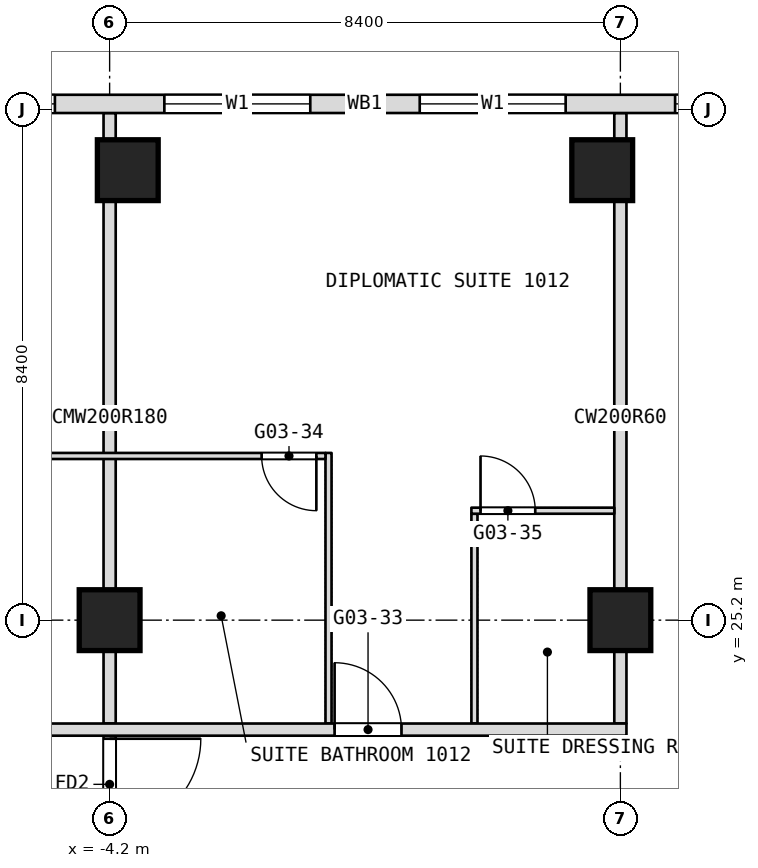
"""IFC4 building model, lengths in metres.
Left out: names, types, materials, properties, quantities, classifications, styles, units other than length and angle.
Written with IfcOpenShell. Run it as: python <this file> out.ifc"""

import sys

from ifc_helpers import new_model, si_unit, direction, frame, frame_2d, origin, origin_2d, place, context, subcontext, project, spatial, rectangle, extrude, element, fill, save


model = new_model("IFC4")
c1 = context("Model", 3, precision=1e-05, world=origin(), true_north=direction((0.0, 1.0)))
c2 = subcontext(c1, "Body", "Model", "MODEL_VIEW")
j1 = project(units=[si_unit("LENGTHUNIT", "METRE"), si_unit("PLANEANGLEUNIT", "RADIAN")], contexts=[c1])
p1 = place(None, origin())
s1 = spatial("IfcSite", under=j1, at=p1, CompositionType="ELEMENT")
p2 = place(p1, origin())
s2 = spatial("IfcBuilding", under=s1, at=p2, CompositionType="ELEMENT")
p3 = place(p2, frame((0.0, 0.0, 50.9)))
s3 = spatial("IfcBuildingStorey", under=s2, at=p3, CompositionType="ELEMENT", Elevation=50.9)
for number, where, z_axis, x_axis in (
    (1, (-4.2, 25.2, 0.0), (0.0, 0.0, 1.0), (1.0, 0.0, 0.0)),
    (2, (4.2, 25.2, 0.0), (0.0, 0.0, 1.0), (1.0, 0.0, 0.0)),
    (3, (-3.901, 32.6, 0.0), (0.0, 0.0, 1.0), (1.0, 0.0, 0.0)),
    (4, (3.901, 32.6, 0.0), (0.0, 0.0, 1.0), (1.0, 0.0, 0.0)),
):
    element("IfcColumn", number, at=place(p3, frame(where, z_axis=z_axis, x_axis=x_axis)), inside=s3, PredefinedType="COLUMN", context=c2, shape_type="SweptSolid", body=[
        extrude(rectangle(XDim=1.0, YDim=1.0, at=origin_2d()), origin(), (0.0, 0.0, 1.0), 3.6),
    ])
p4 = place(p3, frame((4.2, 23.5, 0.0), z_axis=(0.0, 0.0, 1.0), x_axis=(0.0, 1.0, 0.0)))
e5 = element("IfcWall", 5, at=p4, inside=s3, PredefinedType="PARTITIONING", context=c2, shape_type="SweptSolid", body=[
    extrude(rectangle(XDim=10.04, YDim=0.2, at=frame_2d((5.02, 0.0))), origin(), (0.0, 0.0, 1.0), 3.34),
])
p5 = place(p3, frame((1.8, 23.5, 0.0), z_axis=(0.0, 0.0, 1.0), x_axis=(0.0, 1.0, 0.0)))
e6 = element("IfcWall", 6, at=p5, inside=s3, PredefinedType="PARTITIONING", context=c2, shape_type="SweptSolid", body=[
    extrude(rectangle(XDim=3.45, YDim=0.1, at=frame_2d((1.725, 0.0))), origin(), (0.0, 0.0, 1.0), 3.34),
])
p6 = place(p3, frame((-0.6, 23.5, 0.0), z_axis=(0.0, 0.0, 1.0), x_axis=(0.0, 1.0, 0.0)))
e7 = element("IfcWall", 7, at=p6, inside=s3, PredefinedType="PARTITIONING", context=c2, shape_type="SweptSolid", body=[
    extrude(rectangle(XDim=4.45, YDim=0.1, at=frame_2d((2.225, 0.0))), origin(), (0.0, 0.0, 1.0), 3.34),
])
p7 = place(p3, frame((-4.2, 16.8, 0.0), z_axis=(0.0, 0.0, 1.0), x_axis=(0.0, 1.0, 0.0)))
e8 = element("IfcWall", 8, at=p7, inside=s3, PredefinedType="PARTITIONING", context=c2, shape_type="SweptSolid", body=[
    extrude(rectangle(XDim=6.7, YDim=0.2, at=frame_2d((3.35, 0.0))), origin(), (0.0, 0.0, 1.0), 3.34),
])
p8 = place(p7, frame((0.15, 0.0, 0.0)))
e9 = element("IfcOpeningElement", 9, at=p8, cuts=e8, PredefinedType="OPENING", context=c2, shape_type="SweptSolid", body=[
    extrude(rectangle(XDim=1.5, YDim=2.1, at=frame_2d((0.75, 1.05))), frame((0.0, 0.1, 0.0), z_axis=(0.0, -1.0, 0.0), x_axis=(1.0, 0.0, 0.0)), (0.0, 0.0, 1.0), 0.2),
])
p9 = place(p7, frame((4.95, 0.0, 0.0)))
e10 = element("IfcOpeningElement", 10, at=p9, cuts=e8, PredefinedType="OPENING", context=c2, shape_type="SweptSolid", body=[
    extrude(rectangle(XDim=1.5, YDim=2.1, at=frame_2d((0.75, 1.05))), frame((0.0, 0.1, 0.0), z_axis=(0.0, -1.0, 0.0), x_axis=(1.0, 0.0, 0.0)), (0.0, 0.0, 1.0), 0.2),
])
p10 = place(p3, frame((-4.2, 23.5, 0.0), z_axis=(0.0, 0.0, 1.0), x_axis=(0.0, 1.0, 0.0)))
e11 = element("IfcWall", 11, at=p10, inside=s3, PredefinedType="PARTITIONING", context=c2, shape_type="SweptSolid", body=[
    extrude(rectangle(XDim=10.04, YDim=0.2, at=frame_2d((5.02, 0.0))), origin(), (0.0, 0.0, 1.0), 3.34),
])
p11 = place(p3, frame((-16.7, 23.4, 0.0), z_axis=(0.0, 0.0, 1.0), x_axis=(1.0, 0.0, 0.0)))
e12 = element("IfcWall", 12, at=p11, inside=s3, PredefinedType="PARTITIONING", context=c2, shape_type="SweptSolid", body=[
    extrude(rectangle(XDim=21.0, YDim=0.2, at=frame_2d((10.5, 0.0))), origin(), (0.0, 0.0, 1.0), 3.34),
])
p12 = place(p11, frame((2.4, 0.0, 0.0)))
e13 = element("IfcOpeningElement", 13, at=p12, cuts=e12, PredefinedType="OPENING", context=c2, shape_type="SweptSolid", body=[
    extrude(rectangle(XDim=0.9, YDim=2.1, at=frame_2d((0.45, 1.05))), frame((0.0, 0.1, 0.0), z_axis=(0.0, -1.0, 0.0), x_axis=(1.0, 0.0, 0.0)), (0.0, 0.0, 1.0), 0.2),
])
p13 = place(p11, frame((7.7, 0.0, 0.0)))
e14 = element("IfcOpeningElement", 14, at=p13, cuts=e12, PredefinedType="OPENING", context=c2, shape_type="SweptSolid", body=[
    extrude(rectangle(XDim=1.1, YDim=2.1, at=frame_2d((0.55, 1.05))), frame((0.0, 0.1, 0.0), z_axis=(0.0, -1.0, 0.0), x_axis=(1.0, 0.0, 0.0)), (0.0, 0.0, 1.0), 0.2),
])
p14 = place(p11, frame((16.2, 0.0, 0.0)))
e15 = element("IfcOpeningElement", 15, at=p14, cuts=e12, PredefinedType="OPENING", context=c2, shape_type="SweptSolid", body=[
    extrude(rectangle(XDim=1.1, YDim=2.1, at=frame_2d((0.55, 1.05))), frame((0.0, 0.1, 0.0), z_axis=(0.0, -1.0, 0.0), x_axis=(1.0, 0.0, 0.0)), (0.0, 0.0, 1.0), 0.2),
])
p15 = place(p3, frame((1.75, 27.0, 0.0), z_axis=(0.0, 0.0, 1.0), x_axis=(1.0, 0.0, 0.0)))
e16 = element("IfcWall", 16, at=p15, inside=s3, PredefinedType="PARTITIONING", context=c2, shape_type="SweptSolid", body=[
    extrude(rectangle(XDim=2.35, YDim=0.1, at=frame_2d((1.175, 0.0))), origin(), (0.0, 0.0, 1.0), 3.34),
])
p16 = place(p15, frame((0.15, 0.0, 0.0)))
e17 = element("IfcOpeningElement", 17, at=p16, cuts=e16, PredefinedType="OPENING", context=c2, shape_type="SweptSolid", body=[
    extrude(rectangle(XDim=0.9, YDim=2.1, at=frame_2d((0.45, 1.05))), frame((0.0, 0.05, 0.0), z_axis=(0.0, -1.0, 0.0), x_axis=(1.0, 0.0, 0.0)), (0.0, 0.0, 1.0), 0.1),
])
p17 = place(p3, frame((-7.85, 27.9, 0.0), z_axis=(0.0, 0.0, 1.0), x_axis=(1.0, 0.0, 0.0)))
e18 = element("IfcWall", 18, at=p17, inside=s3, PredefinedType="PARTITIONING", context=c2, shape_type="SweptSolid", body=[
    extrude(rectangle(XDim=7.2, YDim=0.1, at=frame_2d((3.6, 0.0))), origin(), (0.0, 0.0, 1.0), 3.34),
])
p18 = place(p17, frame((0.15, 0.0, 0.0)))
e19 = element("IfcOpeningElement", 19, at=p18, cuts=e18, PredefinedType="OPENING", context=c2, shape_type="SweptSolid", body=[
    extrude(rectangle(XDim=0.9, YDim=2.1, at=frame_2d((0.45, 1.05))), frame((0.0, 0.05, 0.0), z_axis=(0.0, -1.0, 0.0), x_axis=(1.0, 0.0, 0.0)), (0.0, 0.0, 1.0), 0.1),
])
p19 = place(p17, frame((6.15, 0.0, 0.0)))
e20 = element("IfcOpeningElement", 20, at=p19, cuts=e18, PredefinedType="OPENING", context=c2, shape_type="SweptSolid", body=[
    extrude(rectangle(XDim=0.9, YDim=2.1, at=frame_2d((0.45, 1.05))), frame((0.0, 0.05, 0.0), z_axis=(0.0, -1.0, 0.0), x_axis=(1.0, 0.0, 0.0)), (0.0, 0.0, 1.0), 0.1),
])
p20 = place(p3, frame((23.406, 33.69, 0.0), z_axis=(0.0, 0.0, 1.0), x_axis=(-1.0, 0.0, 0.0)))
e21 = element("IfcWall", 21, at=p20, inside=s3, PredefinedType="NOTDEFINED", context=c2, shape_type="SweptSolid", body=[
    extrude(rectangle(XDim=46.812, YDim=0.3, at=frame_2d((23.406, 0.0))), origin(), (0.0, 0.0, 1.0), 3.6),
])
p21 = place(p20, frame((2.186, 0.0, 0.9)))
e22 = element("IfcOpeningElement", 22, at=p21, cuts=e21, PredefinedType="OPENING", context=c2, shape_type="SweptSolid", body=[
    extrude(rectangle(XDim=2.4, YDim=2.1, at=frame_2d((1.2, 1.05))), frame((0.0, 0.15, 0.0), z_axis=(0.0, -1.0, 0.0), x_axis=(1.0, 0.0, 0.0)), (0.0, 0.0, 1.0), 0.3),
])
p22 = place(p20, frame((7.506, 0.0, 0.9)))
e23 = element("IfcOpeningElement", 23, at=p22, cuts=e21, PredefinedType="OPENING", context=c2, shape_type="SweptSolid", body=[
    extrude(rectangle(XDim=2.4, YDim=2.1, at=frame_2d((1.2, 1.05))), frame((0.0, 0.15, 0.0), z_axis=(0.0, -1.0, 0.0), x_axis=(1.0, 0.0, 0.0)), (0.0, 0.0, 1.0), 0.3),
])
p23 = place(p20, frame((11.706, 0.0, 0.9)))
e24 = element("IfcOpeningElement", 24, at=p23, cuts=e21, PredefinedType="OPENING", context=c2, shape_type="SweptSolid", body=[
    extrude(rectangle(XDim=2.4, YDim=2.1, at=frame_2d((1.2, 1.05))), frame((0.0, 0.15, 0.0), z_axis=(0.0, -1.0, 0.0), x_axis=(1.0, 0.0, 0.0)), (0.0, 0.0, 1.0), 0.3),
])
p24 = place(p20, frame((15.906, 0.0, 0.9)))
e25 = element("IfcOpeningElement", 25, at=p24, cuts=e21, PredefinedType="OPENING", context=c2, shape_type="SweptSolid", body=[
    extrude(rectangle(XDim=2.4, YDim=2.1, at=frame_2d((1.2, 1.05))), frame((0.0, 0.15, 0.0), z_axis=(0.0, -1.0, 0.0), x_axis=(1.0, 0.0, 0.0)), (0.0, 0.0, 1.0), 0.3),
])
p25 = place(p20, frame((20.106, 0.0, 0.9)))
e26 = element("IfcOpeningElement", 26, at=p25, cuts=e21, PredefinedType="OPENING", context=c2, shape_type="SweptSolid", body=[
    extrude(rectangle(XDim=2.4, YDim=2.1, at=frame_2d((1.2, 1.05))), frame((0.0, 0.15, 0.0), z_axis=(0.0, -1.0, 0.0), x_axis=(1.0, 0.0, 0.0)), (0.0, 0.0, 1.0), 0.3),
])
p26 = place(p20, frame((24.306, 0.0, 0.9)))
e27 = element("IfcOpeningElement", 27, at=p26, cuts=e21, PredefinedType="OPENING", context=c2, shape_type="SweptSolid", body=[
    extrude(rectangle(XDim=2.4, YDim=2.1, at=frame_2d((1.2, 1.05))), frame((0.0, 0.15, 0.0), z_axis=(0.0, -1.0, 0.0), x_axis=(1.0, 0.0, 0.0)), (0.0, 0.0, 1.0), 0.3),
])
p27 = place(p20, frame((28.506, 0.0, 0.9)))
e28 = element("IfcOpeningElement", 28, at=p27, cuts=e21, PredefinedType="OPENING", context=c2, shape_type="SweptSolid", body=[
    extrude(rectangle(XDim=2.4, YDim=2.1, at=frame_2d((1.2, 1.05))), frame((0.0, 0.15, 0.0), z_axis=(0.0, -1.0, 0.0), x_axis=(1.0, 0.0, 0.0)), (0.0, 0.0, 1.0), 0.3),
])
p28 = place(p20, frame((32.706, 0.0, 0.9)))
e29 = element("IfcOpeningElement", 29, at=p28, cuts=e21, PredefinedType="OPENING", context=c2, shape_type="SweptSolid", body=[
    extrude(rectangle(XDim=2.4, YDim=2.1, at=frame_2d((1.2, 1.05))), frame((0.0, 0.15, 0.0), z_axis=(0.0, -1.0, 0.0), x_axis=(1.0, 0.0, 0.0)), (0.0, 0.0, 1.0), 0.3),
])
p29 = place(p20, frame((36.906, 0.0, 0.9)))
e30 = element("IfcOpeningElement", 30, at=p29, cuts=e21, PredefinedType="OPENING", context=c2, shape_type="SweptSolid", body=[
    extrude(rectangle(XDim=2.4, YDim=2.1, at=frame_2d((1.2, 1.05))), frame((0.0, 0.15, 0.0), z_axis=(0.0, -1.0, 0.0), x_axis=(1.0, 0.0, 0.0)), (0.0, 0.0, 1.0), 0.3),
])
p30 = place(p20, frame((42.226, 0.0, 0.9)))
e31 = element("IfcOpeningElement", 31, at=p30, cuts=e21, PredefinedType="OPENING", context=c2, shape_type="SweptSolid", body=[
    extrude(rectangle(XDim=2.4, YDim=2.1, at=frame_2d((1.2, 1.05))), frame((0.0, 0.15, 0.0), z_axis=(0.0, -1.0, 0.0), x_axis=(1.0, 0.0, 0.0)), (0.0, 0.0, 1.0), 0.3),
])
p31 = place(p14, origin())
e32 = element("IfcDoor", 32, at=p31, inside=s3, OperationType="SINGLE_SWING_LEFT", PredefinedType="DOOR", context=c2, shape_type="SweptSolid", body=[
    extrude(rectangle(XDim=1.1, YDim=2.1, at=frame_2d((0.55, 1.05))), frame((0.0, 0.025, 0.0), z_axis=(0.0, -1.0, 0.0), x_axis=(1.0, 0.0, 0.0)), (0.0, 0.0, 1.0), 0.05),
])
fill(e15, e32)
p32 = place(p16, origin())
e33 = element("IfcDoor", 33, at=p32, inside=s3, OperationType="SINGLE_SWING_RIGHT", PredefinedType="DOOR", context=c2, shape_type="SweptSolid", body=[
    extrude(rectangle(XDim=0.9, YDim=2.1, at=frame_2d((0.45, 1.05))), frame((0.0, 0.025, 0.0), z_axis=(0.0, -1.0, 0.0), x_axis=(1.0, 0.0, 0.0)), (0.0, 0.0, 1.0), 0.05),
])
fill(e17, e33)
p33 = place(p19, origin())
e34 = element("IfcDoor", 34, at=p33, inside=s3, OperationType="SINGLE_SWING_LEFT", PredefinedType="DOOR", context=c2, shape_type="SweptSolid", body=[
    extrude(rectangle(XDim=0.9, YDim=2.1, at=frame_2d((0.45, 1.05))), frame((0.0, 0.025, 0.0), z_axis=(0.0, -1.0, 0.0), x_axis=(1.0, 0.0, 0.0)), (0.0, 0.0, 1.0), 0.05),
])
fill(e20, e34)
p34 = place(p24, origin())
e35 = element("IfcWindow", 35, at=p34, inside=s3, PartitioningType="SINGLE_PANEL", PredefinedType="WINDOW", context=c2, shape_type="SweptSolid", body=[
    extrude(rectangle(XDim=2.4, YDim=2.1, at=frame_2d((1.2, 1.05))), frame((0.0, 0.03, 0.0), z_axis=(0.0, -1.0, 0.0), x_axis=(1.0, 0.0, 0.0)), (0.0, 0.0, 1.0), 0.06),
])
fill(e25, e35)
p35 = place(p25, origin())
e36 = element("IfcWindow", 36, at=p35, inside=s3, PartitioningType="SINGLE_PANEL", PredefinedType="WINDOW", context=c2, shape_type="SweptSolid", body=[
    extrude(rectangle(XDim=2.4, YDim=2.1, at=frame_2d((1.2, 1.05))), frame((0.0, 0.03, 0.0), z_axis=(0.0, -1.0, 0.0), x_axis=(1.0, 0.0, 0.0)), (0.0, 0.0, 1.0), 0.06),
])
fill(e26, e36)
p36 = place(p26, origin())
e37 = element("IfcWindow", 37, at=p36, inside=s3, PartitioningType="SINGLE_PANEL", PredefinedType="WINDOW", context=c2, shape_type="SweptSolid", body=[
    extrude(rectangle(XDim=2.4, YDim=2.1, at=frame_2d((1.2, 1.05))), frame((0.0, 0.03, 0.0), z_axis=(0.0, -1.0, 0.0), x_axis=(1.0, 0.0, 0.0)), (0.0, 0.0, 1.0), 0.06),
])
fill(e27, e37)
p37 = place(p27, origin())
e38 = element("IfcWindow", 38, at=p37, inside=s3, PartitioningType="SINGLE_PANEL", PredefinedType="WINDOW", context=c2, shape_type="SweptSolid", body=[
    extrude(rectangle(XDim=2.4, YDim=2.1, at=frame_2d((1.2, 1.05))), frame((0.0, 0.03, 0.0), z_axis=(0.0, -1.0, 0.0), x_axis=(1.0, 0.0, 0.0)), (0.0, 0.0, 1.0), 0.06),
])
fill(e28, e38)
p38 = place(p9, origin())
e39 = element("IfcDoor", 39, at=p38, inside=s3, OperationType="DOUBLE_DOOR_DOUBLE_SWING", PredefinedType="DOOR", context=c2, shape_type="SweptSolid", body=[
    extrude(rectangle(XDim=1.5, YDim=2.1, at=frame_2d((0.75, 1.05))), frame((0.0, 0.025, 0.0), z_axis=(0.0, -1.0, 0.0), x_axis=(1.0, 0.0, 0.0)), (0.0, 0.0, 1.0), 0.05),
])
fill(e10, e39)
save(model, sys.argv[1])
